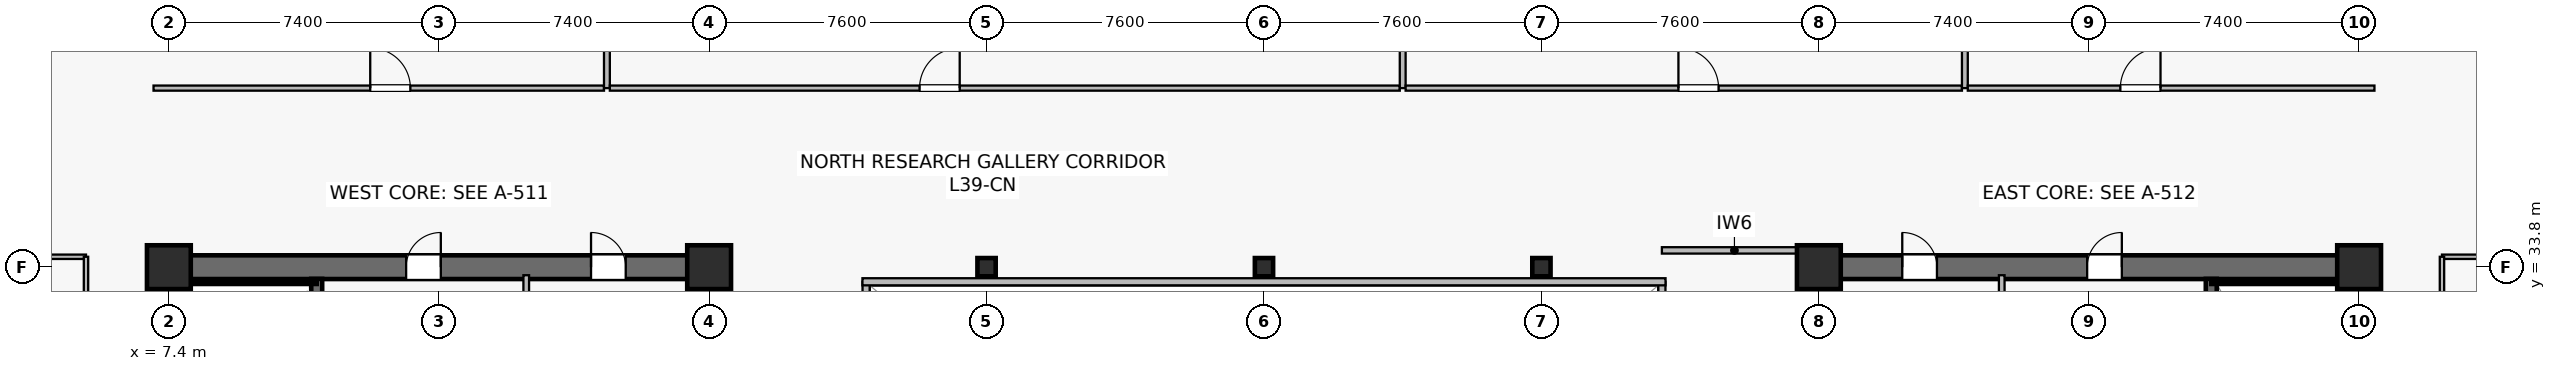
"""IFC4 building model, lengths in metres.
Left out: names, types, materials, properties, quantities, classifications, styles, units other than length and angle.
Written with IfcOpenShell. Run it as: python <this file> out.ifc"""

import sys

from ifc_helpers import new_model, si_unit, direction, frame, frame_2d, origin, origin_2d, place, context, subcontext, project, spatial, rectangle, hollow_rectangle, extrude, source, transform, mapped, element, fill, save


model = new_model("IFC4")
c1 = context("Model", 3, precision=1e-05, world=origin(), true_north=direction((0.0, 1.0)))
c2 = subcontext(c1, "Body", "Model", "MODEL_VIEW")
j1 = project(units=[si_unit("LENGTHUNIT", "METRE"), si_unit("PLANEANGLEUNIT", "RADIAN")], contexts=[c1])
p1 = place(None, origin())
s1 = spatial("IfcSite", under=j1, at=p1, CompositionType="ELEMENT")
p2 = place(p1, origin())
s2 = spatial("IfcBuilding", under=s1, at=p2, CompositionType="ELEMENT")
p3 = place(p2, frame((0.0, 0.0, 162.5)))
s3 = spatial("IfcBuildingStorey", under=s2, at=p3, CompositionType="ELEMENT", Elevation=162.5)
p4 = place(p3, frame((7.075, 33.8, 0.0), z_axis=(0.0, 0.0, 1.0), x_axis=(1.0, 0.0, 0.0)))
e1 = element("IfcWall", 1, at=p4, inside=s3, PredefinedType="SHEAR", context=c2, shape_type="SweptSolid", body=[
    extrude(rectangle(XDim=15.45, YDim=0.65, at=frame_2d((7.725, 0.0))), origin(), (0.0, 0.0, 1.0), 3.79),
])
p5 = place(p4, frame((6.825, 0.0, 0.0)))
e2 = element("IfcOpeningElement", 2, at=p5, cuts=e1, PredefinedType="OPENING", context=c2, shape_type="SweptSolid", body=[
    extrude(rectangle(XDim=0.95, YDim=2.15, at=frame_2d((0.475, 1.075))), frame((0.0, 0.335, 0.0), z_axis=(0.0, -1.0, 0.0), x_axis=(1.0, 0.0, 0.0)), (0.0, 0.0, 1.0), 0.67),
])
p6 = place(p4, frame((11.89, 0.0, 0.0)))
e3 = element("IfcOpeningElement", 3, at=p6, cuts=e1, PredefinedType="OPENING", context=c2, shape_type="SweptSolid", body=[
    extrude(rectangle(XDim=0.95, YDim=2.15, at=frame_2d((0.475, 1.075))), frame((0.0, 0.335, 0.0), z_axis=(0.0, -1.0, 0.0), x_axis=(1.0, 0.0, 0.0)), (0.0, 0.0, 1.0), 0.67),
])
p7 = place(p3, frame((7.4, 15.125, 0.0), z_axis=(0.0, 0.0, 1.0), x_axis=(0.0, 1.0, 0.0)))
e4 = element("IfcWall", 4, at=p7, inside=s3, PredefinedType="SHEAR", context=c2, shape_type="SweptSolid", body=[
    extrude(rectangle(XDim=18.35, YDim=0.65, at=frame_2d((9.175, 0.0))), origin(), (0.0, 0.0, 1.0), 3.79),
])
p8 = place(p3, frame((22.2, 15.125, 0.0), z_axis=(0.0, 0.0, 1.0), x_axis=(0.0, 1.0, 0.0)))
e5 = element("IfcWall", 5, at=p8, inside=s3, PredefinedType="SHEAR", context=c2, shape_type="SweptSolid", body=[
    extrude(rectangle(XDim=18.35, YDim=0.65, at=frame_2d((9.175, 0.0))), origin(), (0.0, 0.0, 1.0), 3.79),
])
p9 = place(p8, frame((3.425, 0.0, 0.0)))
e6 = element("IfcOpeningElement", 6, at=p9, cuts=e5, PredefinedType="OPENING", context=c2, shape_type="SweptSolid", body=[
    extrude(rectangle(XDim=1.42, YDim=2.2, at=frame_2d((0.71, 1.1))), frame((0.0, 0.335, 0.0), z_axis=(0.0, -1.0, 0.0), x_axis=(1.0, 0.0, 0.0)), (0.0, 0.0, 1.0), 0.67),
])
p10 = place(p3, frame((11.45, 24.85, 0.0), z_axis=(0.0, 0.0, 1.0), x_axis=(0.0, 1.0, 0.0)))
e7 = element("IfcWall", 7, at=p10, inside=s3, PredefinedType="SHEAR", context=c2, shape_type="SweptSolid", body=[
    extrude(rectangle(XDim=8.63, YDim=0.3, at=frame_2d((4.315, 0.0))), origin(), (0.0, 0.0, 1.0), 3.79),
])
p11 = place(p10, frame((0.42, 0.0, 0.0)))
e8 = element("IfcOpeningElement", 8, at=p11, cuts=e7, PredefinedType="OPENING", context=c2, shape_type="SweptSolid", body=[
    extrude(rectangle(XDim=1.1, YDim=2.15, at=frame_2d((0.55, 1.075))), frame((0.0, 0.16, 0.0), z_axis=(0.0, -1.0, 0.0), x_axis=(1.0, 0.0, 0.0)), (0.0, 0.0, 1.0), 0.32),
])
p12 = place(p3, frame((7.73, 33.4, 0.0), z_axis=(0.0, 0.0, 1.0), x_axis=(1.0, 0.0, 0.0)))
e9 = element("IfcWall", 9, at=p12, inside=s3, PredefinedType="SOLIDWALL", context=c2, shape_type="SweptSolid", body=[
    extrude(rectangle(XDim=3.72, YDim=0.12, at=frame_2d((1.86, 0.0))), origin(), (0.0, 0.0, 1.0), 3.79),
])
p13 = place(p3, frame((7.73, 25.0, 0.0), z_axis=(0.0, 0.0, 1.0), x_axis=(0.0, 1.0, 0.0)))
e10 = element("IfcWall", 10, at=p13, inside=s3, PredefinedType="SOLIDWALL", context=c2, shape_type="SweptSolid", body=[
    extrude(rectangle(XDim=8.32, YDim=0.12, at=frame_2d((4.16, 0.0))), origin(), (0.0, 0.0, 1.0), 3.79),
])
p14 = place(p3, frame((52.275, 33.8, 0.0), z_axis=(0.0, 0.0, 1.0), x_axis=(1.0, 0.0, 0.0)))
e11 = element("IfcWall", 11, at=p14, inside=s3, PredefinedType="SHEAR", context=c2, shape_type="SweptSolid", body=[
    extrude(rectangle(XDim=15.45, YDim=0.65, at=frame_2d((7.725, 0.0))), origin(), (0.0, 0.0, 1.0), 3.79),
])
p15 = place(p14, frame((7.675, 0.0, 0.0)))
e12 = element("IfcOpeningElement", 12, at=p15, cuts=e11, PredefinedType="OPENING", context=c2, shape_type="SweptSolid", body=[
    extrude(rectangle(XDim=0.95, YDim=2.15, at=frame_2d((0.475, 1.075))), frame((0.0, 0.335, 0.0), z_axis=(0.0, -1.0, 0.0), x_axis=(1.0, 0.0, 0.0)), (0.0, 0.0, 1.0), 0.67),
])
p16 = place(p14, frame((2.61, 0.0, 0.0)))
e13 = element("IfcOpeningElement", 13, at=p16, cuts=e11, PredefinedType="OPENING", context=c2, shape_type="SweptSolid", body=[
    extrude(rectangle(XDim=0.95, YDim=2.15, at=frame_2d((0.475, 1.075))), frame((0.0, 0.335, 0.0), z_axis=(0.0, -1.0, 0.0), x_axis=(1.0, 0.0, 0.0)), (0.0, 0.0, 1.0), 0.67),
])
p17 = place(p3, frame((52.6, 15.125, 0.0), z_axis=(0.0, 0.0, 1.0), x_axis=(0.0, 1.0, 0.0)))
e14 = element("IfcWall", 14, at=p17, inside=s3, PredefinedType="SHEAR", context=c2, shape_type="SweptSolid", body=[
    extrude(rectangle(XDim=18.35, YDim=0.65, at=frame_2d((9.175, 0.0))), origin(), (0.0, 0.0, 1.0), 3.79),
])
p18 = place(p17, frame((3.425, 0.0, 0.0)))
e15 = element("IfcOpeningElement", 15, at=p18, cuts=e14, PredefinedType="OPENING", context=c2, shape_type="SweptSolid", body=[
    extrude(rectangle(XDim=1.42, YDim=2.2, at=frame_2d((0.71, 1.1))), frame((0.0, 0.335, 0.0), z_axis=(0.0, -1.0, 0.0), x_axis=(1.0, 0.0, 0.0)), (0.0, 0.0, 1.0), 0.67),
])
p19 = place(p3, frame((67.4, 15.125, 0.0), z_axis=(0.0, 0.0, 1.0), x_axis=(0.0, 1.0, 0.0)))
e16 = element("IfcWall", 16, at=p19, inside=s3, PredefinedType="SHEAR", context=c2, shape_type="SweptSolid", body=[
    extrude(rectangle(XDim=18.35, YDim=0.65, at=frame_2d((9.175, 0.0))), origin(), (0.0, 0.0, 1.0), 3.79),
])
p20 = place(p3, frame((63.35, 24.85, 0.0), z_axis=(0.0, 0.0, 1.0), x_axis=(0.0, 1.0, 0.0)))
e17 = element("IfcWall", 17, at=p20, inside=s3, PredefinedType="SHEAR", context=c2, shape_type="SweptSolid", body=[
    extrude(rectangle(XDim=8.63, YDim=0.3, at=frame_2d((4.315, 0.0))), origin(), (0.0, 0.0, 1.0), 3.79),
])
p21 = place(p20, frame((0.42, 0.0, 0.0)))
e18 = element("IfcOpeningElement", 18, at=p21, cuts=e17, PredefinedType="OPENING", context=c2, shape_type="SweptSolid", body=[
    extrude(rectangle(XDim=1.1, YDim=2.15, at=frame_2d((0.55, 1.075))), frame((0.0, 0.16, 0.0), z_axis=(0.0, -1.0, 0.0), x_axis=(1.0, 0.0, 0.0)), (0.0, 0.0, 1.0), 0.32),
])
p22 = place(p3, frame((63.35, 33.4, 0.0), z_axis=(0.0, 0.0, 1.0), x_axis=(1.0, 0.0, 0.0)))
e19 = element("IfcWall", 19, at=p22, inside=s3, PredefinedType="SOLIDWALL", context=c2, shape_type="SweptSolid", body=[
    extrude(rectangle(XDim=3.72, YDim=0.12, at=frame_2d((1.86, 0.0))), origin(), (0.0, 0.0, 1.0), 3.79),
])
p23 = place(p3, frame((67.07, 25.0, 0.0), z_axis=(0.0, 0.0, 1.0), x_axis=(0.0, 1.0, 0.0)))
e20 = element("IfcWall", 20, at=p23, inside=s3, PredefinedType="SOLIDWALL", context=c2, shape_type="SweptSolid", body=[
    extrude(rectangle(XDim=8.32, YDim=0.12, at=frame_2d((4.16, 0.0))), origin(), (0.0, 0.0, 1.0), 3.79),
])
m1 = source(origin(), c2, "Body", "SweptSolid", [
    extrude(rectangle(XDim=1.2, YDim=1.2, at=origin_2d()), origin(), (0.0, 0.0, 1.0), 4.1),
])
for number, where, z_axis, x_axis in (
    (21, (7.4, 33.8, 0.0), (0.0, 0.0, 1.0), (1.0, 0.0, 0.0)),
    (22, (22.2, 33.8, 0.0), (0.0, 0.0, 1.0), (1.0, 0.0, 0.0)),
    (23, (52.6, 33.8, 0.0), (0.0, 0.0, 1.0), (1.0, 0.0, 0.0)),
    (24, (67.4, 33.8, 0.0), (0.0, 0.0, 1.0), (1.0, 0.0, 0.0)),
):
    element("IfcColumn", number, at=place(p3, frame(where, z_axis=z_axis, x_axis=x_axis)), inside=s3, PredefinedType="COLUMN", context=c2, shape_type="MappedRepresentation", body=[
        mapped(m1, transform((0.0, 0.0, 0.0), scale=1.0)),
    ])
m2 = source(origin(), c2, "Body", "SweptSolid", [
    extrude(hollow_rectangle(XDim=0.5, YDim=0.5, WallThickness=0.022, at=origin_2d()), origin(), (0.0, 0.0, 1.0), 4.1),
])
for number, where, z_axis, x_axis in (
    (25, (29.8, 33.8, 0.0), (0.0, 0.0, 1.0), (1.0, 0.0, 0.0)),
    (26, (37.4, 33.8, 0.0), (0.0, 0.0, 1.0), (1.0, 0.0, 0.0)),
    (27, (45.0, 33.8, 0.0), (0.0, 0.0, 1.0), (1.0, 0.0, 0.0)),
):
    element("IfcColumn", number, at=place(p3, frame(where, z_axis=z_axis, x_axis=x_axis)), inside=s3, PredefinedType="COLUMN", context=c2, shape_type="MappedRepresentation", body=[
        mapped(m2, transform((0.0, 0.0, 0.0), scale=1.0)),
    ])
for number, where, z_axis, x_axis in (
    (28, (17.19, 29.65, 0.0), (0.0, 0.0, 1.0), (0.0, 1.0, 0.0)),
    (29, (57.61, 29.65, 0.0), (0.0, 0.0, 1.0), (0.0, 1.0, 0.0)),
):
    element("IfcWall", number, at=place(p3, frame(where, z_axis=z_axis, x_axis=x_axis)), inside=s3, PredefinedType="PLUMBINGWALL", context=c2, shape_type="SweptSolid", body=[
        extrude(rectangle(XDim=3.93, YDim=0.155, at=frame_2d((1.965, 0.0))), origin(), (0.0, 0.0, 1.0), 3.79),
    ])
p24 = place(p3, frame((48.3, 34.26, 0.0), z_axis=(0.0, 0.0, 1.0), x_axis=(1.0, 0.0, 0.0)))
e30 = element("IfcWall", 30, at=p24, inside=s3, PredefinedType="PARTITIONING", context=c2, shape_type="SweptSolid", body=[
    extrude(rectangle(XDim=3.975, YDim=0.175, at=frame_2d((1.987, 0.0))), origin(), (0.0, 0.0, 1.0), 3.475),
])
p25 = place(p3, frame((26.5, 15.2, 0.0), z_axis=(0.0, 0.0, 1.0), x_axis=(0.0, 1.0, 0.0)))
e31 = element("IfcWall", 31, at=p25, inside=s3, PredefinedType="SOLIDWALL", context=c2, shape_type="SweptSolid", body=[
    extrude(rectangle(XDim=18.2, YDim=0.195, at=frame_2d((9.1, 0.0))), origin(), (0.0, 0.0, 1.0), 3.79),
])
p26 = place(p25, frame((1.8, 0.0, 0.9)))
e32 = element("IfcOpeningElement", 32, at=p26, cuts=e31, PredefinedType="OPENING", context=c2, shape_type="SweptSolid", body=[
    extrude(rectangle(XDim=1.2, YDim=1.35, at=frame_2d((0.6, 0.675))), frame((0.0, 0.107, 0.0), z_axis=(0.0, -1.0, 0.0), x_axis=(1.0, 0.0, 0.0)), (0.0, 0.0, 1.0), 0.215),
])
p27 = place(p25, frame((13.2, 0.0, 0.9)))
e33 = element("IfcOpeningElement", 33, at=p27, cuts=e31, PredefinedType="OPENING", context=c2, shape_type="SweptSolid", body=[
    extrude(rectangle(XDim=1.2, YDim=1.35, at=frame_2d((0.6, 0.675))), frame((0.0, 0.107, 0.0), z_axis=(0.0, -1.0, 0.0), x_axis=(1.0, 0.0, 0.0)), (0.0, 0.0, 1.0), 0.215),
])
p28 = place(p3, frame((48.3, 15.2, 0.0), z_axis=(0.0, 0.0, 1.0), x_axis=(0.0, 1.0, 0.0)))
e34 = element("IfcWall", 34, at=p28, inside=s3, PredefinedType="SOLIDWALL", context=c2, shape_type="SweptSolid", body=[
    extrude(rectangle(XDim=18.2, YDim=0.195, at=frame_2d((9.1, 0.0))), origin(), (0.0, 0.0, 1.0), 3.79),
])
p29 = place(p28, frame((1.8, 0.0, 0.9)))
e35 = element("IfcOpeningElement", 35, at=p29, cuts=e34, PredefinedType="OPENING", context=c2, shape_type="SweptSolid", body=[
    extrude(rectangle(XDim=1.2, YDim=1.35, at=frame_2d((0.6, 0.675))), frame((0.0, 0.107, 0.0), z_axis=(0.0, -1.0, 0.0), x_axis=(1.0, 0.0, 0.0)), (0.0, 0.0, 1.0), 0.215),
])
p30 = place(p28, frame((13.2, 0.0, 0.9)))
e36 = element("IfcOpeningElement", 36, at=p30, cuts=e34, PredefinedType="OPENING", context=c2, shape_type="SweptSolid", body=[
    extrude(rectangle(XDim=1.2, YDim=1.35, at=frame_2d((0.6, 0.675))), frame((0.0, 0.107, 0.0), z_axis=(0.0, -1.0, 0.0), x_axis=(1.0, 0.0, 0.0)), (0.0, 0.0, 1.0), 0.215),
])
p31 = place(p3, frame((26.4, 33.4, 0.0), z_axis=(0.0, 0.0, 1.0), x_axis=(1.0, 0.0, 0.0)))
e37 = element("IfcWall", 37, at=p31, inside=s3, PredefinedType="SOLIDWALL", context=c2, shape_type="SweptSolid", body=[
    extrude(rectangle(XDim=22.0, YDim=0.195, at=frame_2d((11.0, 0.0))), origin(), (0.0, 0.0, 1.0), 3.79),
])
p32 = place(p3, frame((6.98, 38.705, 0.0), z_axis=(0.0, 0.0, 1.0), x_axis=(1.0, 0.0, 0.0)))
e38 = element("IfcWall", 38, at=p32, inside=s3, PredefinedType="PARTITIONING", context=c2, shape_type="SweptSolid", body=[
    extrude(rectangle(XDim=12.34, YDim=0.14, at=frame_2d((6.17, 0.0))), origin(), (0.0, 0.0, 1.0), 3.187),
])
p33 = place(p32, frame((5.936, 0.0, 0.0)))
e39 = element("IfcOpeningElement", 39, at=p33, cuts=e38, PredefinedType="OPENING", context=c2, shape_type="SweptSolid", body=[
    extrude(rectangle(XDim=1.1, YDim=2.18, at=frame_2d((0.55, 1.09))), frame((0.0, 0.08, 0.0), z_axis=(0.0, -1.0, 0.0), x_axis=(1.0, 0.0, 0.0)), (0.0, 0.0, 1.0), 0.16),
])
p34 = place(p3, frame((19.4, 38.705, 0.0), z_axis=(0.0, 0.0, 1.0), x_axis=(0.0, 1.0, 0.0)))
e40 = element("IfcWall", 40, at=p34, inside=s3, PredefinedType="PARTITIONING", context=c2, shape_type="SweptSolid", body=[
    extrude(rectangle(XDim=8.485, YDim=0.16, at=frame_2d((4.242, 0.0))), origin(), (0.0, 0.0, 1.0), 3.075),
])
p35 = place(p3, frame((19.48, 38.705, 0.0), z_axis=(0.0, 0.0, 1.0), x_axis=(1.0, 0.0, 0.0)))
e41 = element("IfcWall", 41, at=p35, inside=s3, PredefinedType="PARTITIONING", context=c2, shape_type="SweptSolid", body=[
    extrude(rectangle(XDim=21.64, YDim=0.14, at=frame_2d((10.82, 0.0))), origin(), (0.0, 0.0, 1.0), 3.187),
])
p36 = place(p35, frame((8.484, 0.0, 0.0)))
e42 = element("IfcOpeningElement", 42, at=p36, cuts=e41, PredefinedType="OPENING", context=c2, shape_type="SweptSolid", body=[
    extrude(rectangle(XDim=1.1, YDim=2.18, at=frame_2d((0.55, 1.09))), frame((0.0, 0.08, 0.0), z_axis=(0.0, -1.0, 0.0), x_axis=(1.0, 0.0, 0.0)), (0.0, 0.0, 1.0), 0.16),
])
p37 = place(p3, frame((41.2, 38.705, 0.0), z_axis=(0.0, 0.0, 1.0), x_axis=(0.0, 1.0, 0.0)))
e43 = element("IfcWall", 43, at=p37, inside=s3, PredefinedType="PARTITIONING", context=c2, shape_type="SweptSolid", body=[
    extrude(rectangle(XDim=7.285, YDim=0.16, at=frame_2d((3.643, 0.0))), origin(), (0.0, 0.0, 1.0), 3.075),
])
p38 = place(p3, frame((41.28, 38.705, 0.0), z_axis=(0.0, 0.0, 1.0), x_axis=(1.0, 0.0, 0.0)))
e44 = element("IfcWall", 44, at=p38, inside=s3, PredefinedType="PARTITIONING", context=c2, shape_type="SweptSolid", body=[
    extrude(rectangle(XDim=15.24, YDim=0.14, at=frame_2d((7.62, 0.0))), origin(), (0.0, 0.0, 1.0), 3.187),
])
p39 = place(p38, frame((7.473, 0.0, 0.0)))
e45 = element("IfcOpeningElement", 45, at=p39, cuts=e44, PredefinedType="OPENING", context=c2, shape_type="SweptSolid", body=[
    extrude(rectangle(XDim=1.1, YDim=2.18, at=frame_2d((0.55, 1.09))), frame((0.0, 0.08, 0.0), z_axis=(0.0, -1.0, 0.0), x_axis=(1.0, 0.0, 0.0)), (0.0, 0.0, 1.0), 0.16),
])
p40 = place(p3, frame((56.6, 38.705, 0.0), z_axis=(0.0, 0.0, 1.0), x_axis=(0.0, 1.0, 0.0)))
e46 = element("IfcWall", 46, at=p40, inside=s3, PredefinedType="PARTITIONING", context=c2, shape_type="SweptSolid", body=[
    extrude(rectangle(XDim=8.485, YDim=0.16, at=frame_2d((4.242, 0.0))), origin(), (0.0, 0.0, 1.0), 3.075),
])
p41 = place(p3, frame((56.68, 38.705, 0.0), z_axis=(0.0, 0.0, 1.0), x_axis=(1.0, 0.0, 0.0)))
e47 = element("IfcWall", 47, at=p41, inside=s3, PredefinedType="PARTITIONING", context=c2, shape_type="SweptSolid", body=[
    extrude(rectangle(XDim=11.14, YDim=0.14, at=frame_2d((5.57, 0.0))), origin(), (0.0, 0.0, 1.0), 3.187),
])
p42 = place(p41, frame((4.179, 0.0, 0.0)))
e48 = element("IfcOpeningElement", 48, at=p42, cuts=e47, PredefinedType="OPENING", context=c2, shape_type="SweptSolid", body=[
    extrude(rectangle(XDim=1.1, YDim=2.18, at=frame_2d((0.55, 1.09))), frame((0.0, 0.08, 0.0), z_axis=(0.0, -1.0, 0.0), x_axis=(1.0, 0.0, 0.0)), (0.0, 0.0, 1.0), 0.16),
])
p43 = place(p3, frame((2.11, 34.085, 0.0), z_axis=(0.0, 0.0, 1.0), x_axis=(1.0, 0.0, 0.0)))
e49 = element("IfcWall", 49, at=p43, inside=s3, PredefinedType="PARTITIONING", context=c2, shape_type="SweptSolid", body=[
    extrude(rectangle(XDim=3.02, YDim=0.12, at=frame_2d((1.51, 0.0))), origin(), (0.0, 0.0, 1.0), 3.79),
])
p44 = place(p3, frame((5.13, 27.86, 0.0), z_axis=(0.0, 0.0, 1.0), x_axis=(0.0, 1.0, 0.0)))
e50 = element("IfcWall", 50, at=p44, inside=s3, PredefinedType="PARTITIONING", context=c2, shape_type="SweptSolid", body=[
    extrude(rectangle(XDim=6.225, YDim=0.12, at=frame_2d((3.112, 0.0))), origin(), (0.0, 0.0, 1.0), 3.79),
])
p45 = place(p44, frame((2.663, 0.0, 0.0)))
e51 = element("IfcOpeningElement", 51, at=p45, cuts=e50, PredefinedType="OPENING", context=c2, shape_type="SweptSolid", body=[
    extrude(rectangle(XDim=0.9, YDim=2.1, at=frame_2d((0.45, 1.05))), frame((0.0, 0.07, 0.0), z_axis=(0.0, -1.0, 0.0), x_axis=(1.0, 0.0, 0.0)), (0.0, 0.0, 1.0), 0.14),
])
p46 = place(p3, frame((69.67, 34.085, 0.0), z_axis=(0.0, 0.0, 1.0), x_axis=(1.0, 0.0, 0.0)))
e52 = element("IfcWall", 52, at=p46, inside=s3, PredefinedType="PARTITIONING", context=c2, shape_type="SweptSolid", body=[
    extrude(rectangle(XDim=3.02, YDim=0.12, at=frame_2d((1.51, 0.0))), origin(), (0.0, 0.0, 1.0), 3.79),
])
p47 = place(p3, frame((69.67, 24.46, 0.0), z_axis=(0.0, 0.0, 1.0), x_axis=(0.0, 1.0, 0.0)))
e53 = element("IfcWall", 53, at=p47, inside=s3, PredefinedType="PARTITIONING", context=c2, shape_type="SweptSolid", body=[
    extrude(rectangle(XDim=9.625, YDim=0.12, at=frame_2d((4.812, 0.0))), origin(), (0.0, 0.0, 1.0), 3.79),
])
p48 = place(p47, frame((4.363, 0.0, 0.0)))
e54 = element("IfcOpeningElement", 54, at=p48, cuts=e53, PredefinedType="OPENING", context=c2, shape_type="SweptSolid", body=[
    extrude(rectangle(XDim=0.9, YDim=2.1, at=frame_2d((0.45, 1.05))), frame((0.0, 0.07, 0.0), z_axis=(0.0, -1.0, 0.0), x_axis=(1.0, 0.0, 0.0)), (0.0, 0.0, 1.0), 0.14),
])
m3 = source(origin(), c2, "Body", "SweptSolid", [
    extrude(rectangle(XDim=0.95, YDim=2.15, at=frame_2d((0.475, 1.075))), frame((0.0, 0.025, 0.0), z_axis=(0.0, -1.0, 0.0), x_axis=(1.0, 0.0, 0.0)), (0.0, 0.0, 1.0), 0.05),
])
p49 = place(p5, origin())
e55 = element("IfcDoor", 55, at=p49, inside=s3, OperationType="SINGLE_SWING_RIGHT", PredefinedType="DOOR", context=c2, shape_type="MappedRepresentation", body=[
    mapped(m3, transform((0.0, 0.0, 0.0), scale=1.0)),
])
fill(e2, e55)
p50 = place(p6, origin())
e56 = element("IfcDoor", 56, at=p50, inside=s3, OperationType="SINGLE_SWING_LEFT", PredefinedType="DOOR", context=c2, shape_type="MappedRepresentation", body=[
    mapped(m3, transform((0.0, 0.0, 0.0), scale=1.0)),
])
fill(e3, e56)
p51 = place(p15, origin())
e57 = element("IfcDoor", 57, at=p51, inside=s3, OperationType="SINGLE_SWING_RIGHT", PredefinedType="DOOR", context=c2, shape_type="MappedRepresentation", body=[
    mapped(m3, transform((0.0, 0.0, 0.0), scale=1.0)),
])
fill(e12, e57)
p52 = place(p16, origin())
e58 = element("IfcDoor", 58, at=p52, inside=s3, OperationType="SINGLE_SWING_LEFT", PredefinedType="DOOR", context=c2, shape_type="MappedRepresentation", body=[
    mapped(m3, transform((0.0, 0.0, 0.0), scale=1.0)),
])
fill(e13, e58)
m4 = source(origin(), c2, "Body", "SweptSolid", [
    extrude(rectangle(XDim=1.1, YDim=2.18, at=frame_2d((0.55, 1.09))), frame((0.0, 0.025, 0.0), z_axis=(0.0, -1.0, 0.0), x_axis=(1.0, 0.0, 0.0)), (0.0, 0.0, 1.0), 0.05),
])
p53 = place(p33, origin())
e59 = element("IfcDoor", 59, at=p53, inside=s3, OperationType="SINGLE_SWING_LEFT", PredefinedType="DOOR", context=c2, shape_type="MappedRepresentation", body=[
    mapped(m4, transform((0.0, 0.0, 0.0), scale=1.0)),
])
fill(e39, e59)
p54 = place(p36, origin())
e60 = element("IfcDoor", 60, at=p54, inside=s3, OperationType="SINGLE_SWING_RIGHT", PredefinedType="DOOR", context=c2, shape_type="MappedRepresentation", body=[
    mapped(m4, transform((0.0, 0.0, 0.0), scale=1.0)),
])
fill(e42, e60)
p55 = place(p39, origin())
e61 = element("IfcDoor", 61, at=p55, inside=s3, OperationType="SINGLE_SWING_LEFT", PredefinedType="DOOR", context=c2, shape_type="MappedRepresentation", body=[
    mapped(m4, transform((0.0, 0.0, 0.0), scale=1.0)),
])
fill(e45, e61)
p56 = place(p42, origin())
e62 = element("IfcDoor", 62, at=p56, inside=s3, OperationType="SINGLE_SWING_RIGHT", PredefinedType="DOOR", context=c2, shape_type="MappedRepresentation", body=[
    mapped(m4, transform((0.0, 0.0, 0.0), scale=1.0)),
])
fill(e48, e62)
save(model, sys.argv[1])
